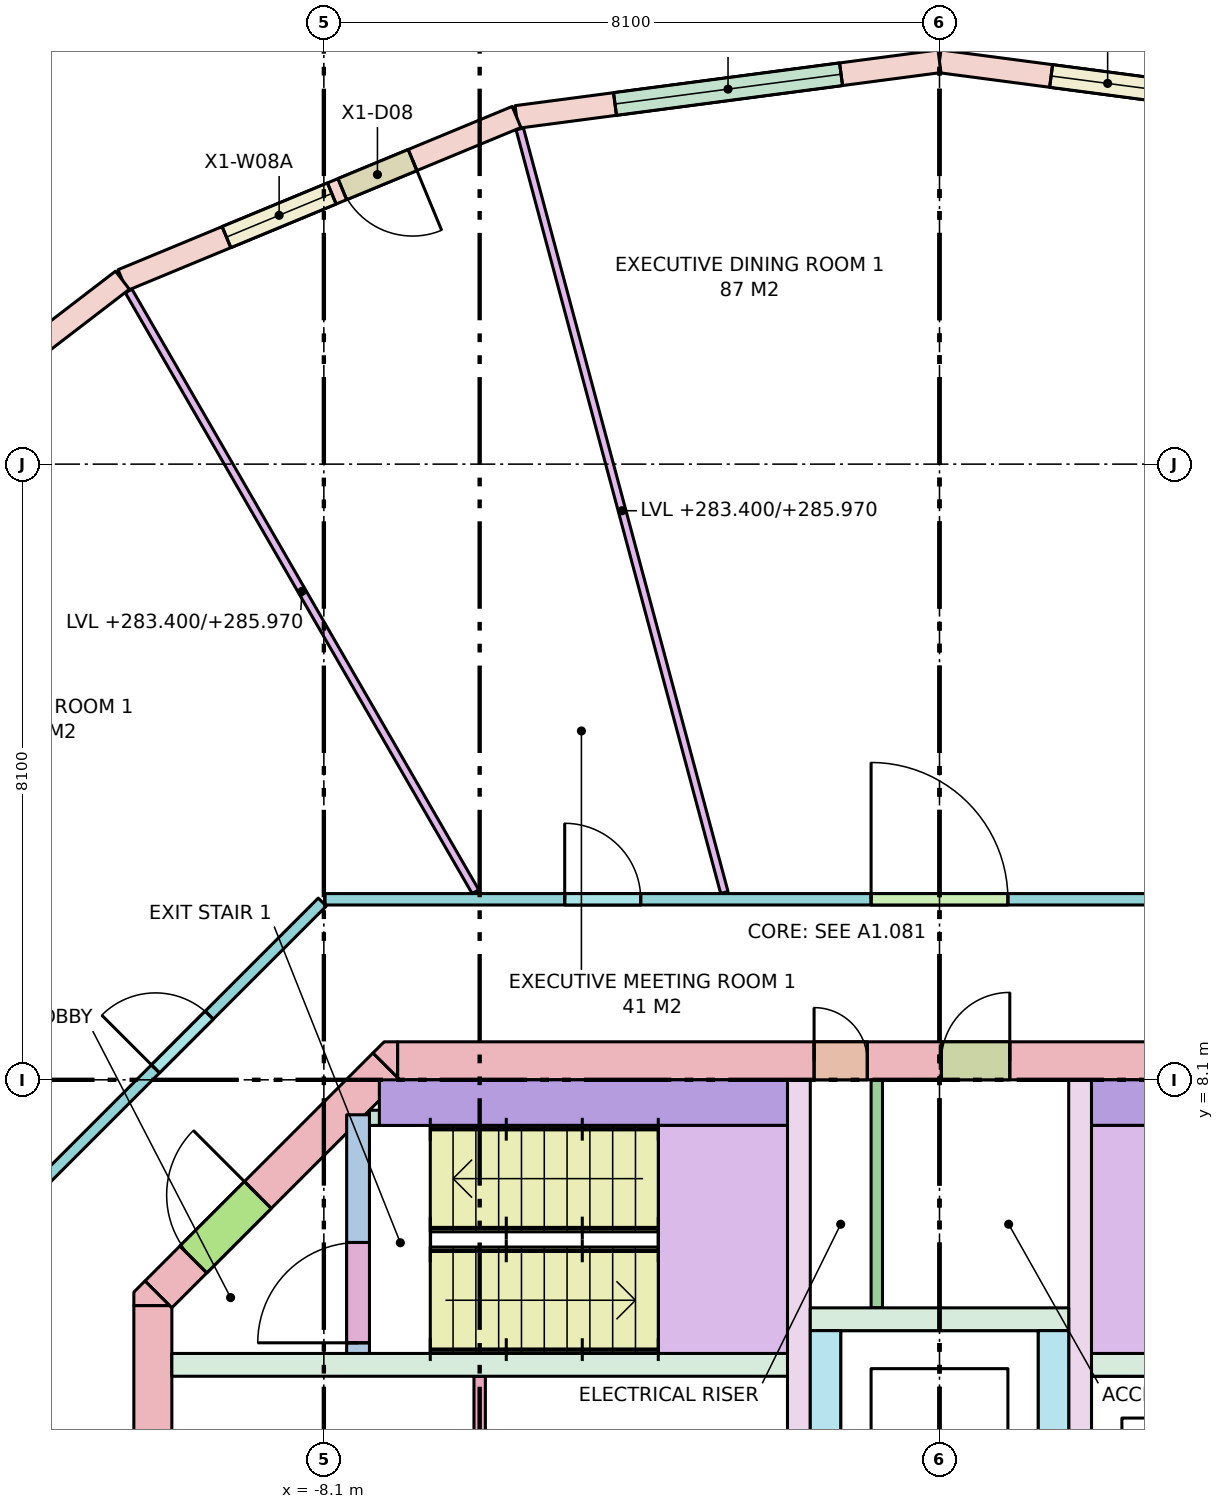
"""IFC4 building model, lengths in metres.
Left out: names, types, materials, properties, quantities, classifications, styles, units other than length and angle.
Written with IfcOpenShell. Run it as: python <this file> out.ifc"""

import sys

from ifc_helpers import new_model, si_unit, direction, frame, frame_2d, origin, place, context, subcontext, project, spatial, polyline, rectangle, outline, extrude, element, fill, save


model = new_model("IFC4")
c1 = context("Model", 3, precision=1e-05, world=origin(), true_north=direction((0.0, 1.0)))
c2 = subcontext(c1, "Body", "Model", "MODEL_VIEW")
j1 = project(units=[si_unit("LENGTHUNIT", "METRE"), si_unit("PLANEANGLEUNIT", "RADIAN")], contexts=[c1])
p1 = place(None, origin())
s1 = spatial("IfcSite", under=j1, at=p1, CompositionType="ELEMENT")
p2 = place(p1, origin())
s2 = spatial("IfcBuilding", under=s1, at=p2, CompositionType="ELEMENT")
p3 = place(p2, frame((0.0, 0.0, 283.4)))
s3 = spatial("IfcBuildingStorey", under=s2, at=p3, CompositionType="ELEMENT", Elevation=283.4)
p4 = place(p3, frame((-7.13, 8.35, -0.28), z_axis=(0.0, 0.0, 1.0), x_axis=(1.0, 0.0, 0.0)))
e1 = element("IfcWall", 1, at=p4, inside=s3, PredefinedType="SHEAR", context=c2, shape_type="SweptSolid", body=[
    extrude(rectangle(XDim=14.26, YDim=0.5, at=frame_2d((7.13, 0.0))), origin(), (0.0, 0.0, 1.0), 3.7),
])
p5 = place(p4, frame((5.48, 0.0, 0.28)))
e2 = element("IfcOpeningElement", 2, at=p5, cuts=e1, PredefinedType="OPENING", context=c2, shape_type="SweptSolid", body=[
    extrude(rectangle(XDim=0.7, YDim=2.1, at=frame_2d((0.35, 1.05))), frame((0.0, 0.26, 0.0), z_axis=(0.0, -1.0, 0.0), x_axis=(1.0, 0.0, 0.0)), (0.0, 0.0, 1.0), 0.52),
])
p6 = place(p4, frame((7.155, 0.0, 0.28)))
e3 = element("IfcOpeningElement", 3, at=p6, cuts=e1, PredefinedType="OPENING", context=c2, shape_type="SweptSolid", body=[
    extrude(rectangle(XDim=0.9, YDim=2.1, at=frame_2d((0.45, 1.05))), frame((0.0, 0.26, 0.0), z_axis=(0.0, -1.0, 0.0), x_axis=(1.0, 0.0, 0.0)), (0.0, 0.0, 1.0), 0.52),
])
p7 = place(p3, frame((-10.35, -5.13, -0.28), z_axis=(0.0, 0.0, 1.0), x_axis=(0.0, 1.0, 0.0)))
e4 = element("IfcWall", 4, at=p7, inside=s3, PredefinedType="SHEAR", context=c2, shape_type="SweptSolid", body=[
    extrude(rectangle(XDim=10.26, YDim=0.5, at=frame_2d((5.13, 0.0))), origin(), (0.0, 0.0, 1.0), 3.7),
])
p8 = place(p7, frame((4.13, 0.0, 0.28)))
e5 = element("IfcOpeningElement", 5, at=p8, cuts=e4, PredefinedType="OPENING", context=c2, shape_type="SweptSolid", body=[
    extrude(rectangle(XDim=2.0, YDim=2.1, at=frame_2d((1.0, 1.05))), frame((0.0, 0.26, 0.0), z_axis=(0.0, -1.0, 0.0), x_axis=(1.0, 0.0, 0.0)), (0.0, 0.0, 1.0), 0.52),
])
p9 = place(p3, frame((-10.277, 5.277, -0.28), z_axis=(0.0, 0.0, 1.0), x_axis=(0.707106781187, 0.707106781187, 0.0)))
e6 = element("IfcWall", 6, at=p9, inside=s3, PredefinedType="SHEAR", context=c2, shape_type="SweptSolid", body=[
    extrude(rectangle(XDim=4.243, YDim=0.5, at=frame_2d((2.121, 0.0))), origin(), (0.0, 0.0, 1.0), 3.7),
])
p10 = place(p9, frame((0.65, 0.0, 0.28)))
e7 = element("IfcOpeningElement", 7, at=p10, cuts=e6, PredefinedType="OPENING", context=c2, shape_type="SweptSolid", body=[
    extrude(rectangle(XDim=1.2, YDim=2.1, at=frame_2d((0.6, 1.05))), frame((0.0, 0.26, 0.0), z_axis=(0.0, -1.0, 0.0), x_axis=(1.0, 0.0, 0.0)), (0.0, 0.0, 1.0), 0.52),
])
p11 = place(p3, frame((0.0, 0.0, -0.28)))
e8 = element("IfcWall", 8, at=p11, inside=s3, PredefinedType="SHEAR", context=c2, shape_type="SweptSolid", body=[
    extrude(outline(polyline([(-10.454, 5.454), (-10.13, 5.13), (-10.6, 5.13), (-10.6, 5.307), (-10.454, 5.454)])), origin(), (0.0, 0.0, 1.0), 3.7),
])
p12 = place(p3, frame((0.0, 0.0, -0.28)))
e9 = element("IfcWall", 9, at=p12, inside=s3, PredefinedType="SHEAR", context=c2, shape_type="SweptSolid", body=[
    extrude(outline(polyline([(-7.307, 8.6), (-7.13, 8.6), (-7.13, 8.13), (-7.454, 8.454), (-7.307, 8.6)])), origin(), (0.0, 0.0, 1.0), 3.7),
])
for number, where, z_axis, x_axis in (
    (10, (-10.1, 4.35, 0.0), (0.0, 0.0, 1.0), (1.0, 0.0, 0.0)),
    (11, (2.0, 4.35, 0.0), (0.0, 0.0, 1.0), (1.0, 0.0, 0.0)),
):
    element("IfcWall", number, at=place(p3, frame(where, z_axis=z_axis, x_axis=x_axis)), inside=s3, PredefinedType="SOLIDWALL", context=c2, shape_type="SweptSolid", body=[
        extrude(rectangle(XDim=8.1, YDim=0.3, at=frame_2d((4.05, 0.0))), origin(), (0.0, 0.0, 1.0), 3.42),
    ])
for number, where, z_axis, x_axis in (
    (12, (-1.85, 1.5, 0.0), (0.0, 0.0, 1.0), (0.0, 1.0, 0.0)),
    (13, (1.85, 1.5, 0.0), (0.0, 0.0, 1.0), (0.0, 1.0, 0.0)),
):
    element("IfcWall", number, at=place(p3, frame(where, z_axis=z_axis, x_axis=x_axis)), inside=s3, PredefinedType="SHEAR", context=c2, shape_type="SweptSolid", body=[
        extrude(rectangle(XDim=6.6, YDim=0.3, at=frame_2d((3.3, 0.0))), origin(), (0.0, 0.0, 1.0), 3.42),
    ])
for number, where, z_axis, x_axis in (
    (14, (-1.5, 1.8, 0.0), (0.0, 0.0, 1.0), (0.0, 1.0, 0.0)),
    (15, (1.5, 1.8, 0.0), (0.0, 0.0, 1.0), (0.0, 1.0, 0.0)),
):
    element("IfcWall", number, at=place(p3, frame(where, z_axis=z_axis, x_axis=x_axis)), inside=s3, PredefinedType="SOLIDWALL", context=c2, shape_type="SweptSolid", body=[
        extrude(rectangle(XDim=3.0, YDim=0.4, at=frame_2d((1.5, 0.0))), origin(), (0.0, 0.0, 1.0), 3.42),
    ])
p13 = place(p3, frame((-1.7, 4.95, 0.0), z_axis=(0.0, 0.0, 1.0), x_axis=(1.0, 0.0, 0.0)))
e16 = element("IfcWall", 16, at=p13, inside=s3, PredefinedType="SOLIDWALL", context=c2, shape_type="SweptSolid", body=[
    extrude(rectangle(XDim=3.4, YDim=0.3, at=frame_2d((1.7, 0.0))), origin(), (0.0, 0.0, 1.0), 3.42),
])
p14 = place(p3, frame((-7.65, 4.5, 0.0), z_axis=(0.0, 0.0, 1.0), x_axis=(0.0, 1.0, 0.0)))
e17 = element("IfcWall", 17, at=p14, inside=s3, PredefinedType="SHEAR", context=c2, shape_type="SweptSolid", body=[
    extrude(rectangle(XDim=3.14, YDim=0.3, at=frame_2d((1.57, 0.0))), origin(), (0.0, 0.0, 1.0), 3.42),
])
p15 = place(p14, frame((0.14, 0.0, 0.0)))
e18 = element("IfcOpeningElement", 18, at=p15, cuts=e17, PredefinedType="OPENING", context=c2, shape_type="SweptSolid", body=[
    extrude(rectangle(XDim=1.32, YDim=2.1, at=frame_2d((0.66, 1.05))), frame((0.0, 0.16, 0.0), z_axis=(0.0, -1.0, 0.0), x_axis=(1.0, 0.0, 0.0)), (0.0, 0.0, 1.0), 0.32),
])
for number, where, z_axis, x_axis in (
    (19, (-7.37, 7.8, 0.0), (0.0, 0.0, 1.0), (1.0, 0.0, 0.0)),
    (20, (2.0, 7.8, 0.0), (0.0, 0.0, 1.0), (1.0, 0.0, 0.0)),
):
    element("IfcWall", number, at=place(p3, frame(where, z_axis=z_axis, x_axis=x_axis)), inside=s3, PredefinedType="SHEAR", context=c2, shape_type="SweptSolid", body=[
        extrude(rectangle(XDim=5.37, YDim=0.6, at=frame_2d((2.685, 0.0))), origin(), (0.0, 0.0, 1.0), 3.42),
    ])
p16 = place(p3, frame((-7.5, 7.6, 0.0), z_axis=(0.0, 0.0, 1.0), x_axis=(1.0, 0.0, 0.0)))
e21 = element("IfcWall", 21, at=p16, inside=s3, PredefinedType="SHEAR", context=c2, shape_type="SweptSolid", body=[
    extrude(rectangle(XDim=0.6, YDim=0.2, at=frame_2d((0.3, 0.0))), origin(), (0.0, 0.0, 1.0), 3.42),
])
p17 = place(p3, frame((5.565, 20.767, 0.0), z_axis=(0.0, 0.0, 1.0), x_axis=(-0.991443484334, 0.130536651449, 0.0)))
e22 = element("IfcWall", 22, at=p17, inside=s3, PredefinedType="STANDARD", context=c2, shape_type="SweptSolid", body=[
    extrude(rectangle(XDim=5.613, YDim=0.3, at=frame_2d((2.806, 0.0))), origin(), (0.0, 0.0, 1.0), 3.42),
])
p18 = place(p17, frame((1.481, 0.0, 0.0)))
e23 = element("IfcOpeningElement", 23, at=p18, cuts=e22, PredefinedType="OPENING", context=c2, shape_type="SweptSolid", body=[
    extrude(rectangle(XDim=1.0, YDim=2.4, at=frame_2d((0.5, 1.2))), frame((0.0, 0.16, 0.0), z_axis=(0.0, -1.0, 0.0), x_axis=(1.0, 0.0, 0.0)), (0.0, 0.0, 1.0), 0.32),
])
p19 = place(p17, frame((2.631, 0.0, 0.8)))
e24 = element("IfcOpeningElement", 24, at=p19, cuts=e22, PredefinedType="OPENING", context=c2, shape_type="SweptSolid", body=[
    extrude(rectangle(XDim=1.5, YDim=2.4, at=frame_2d((0.75, 1.2))), frame((0.0, 0.16, 0.0), z_axis=(0.0, -1.0, 0.0), x_axis=(1.0, 0.0, 0.0)), (0.0, 0.0, 1.0), 0.32),
])
p20 = place(p3, frame((0.0, 21.5, 0.0), z_axis=(0.0, 0.0, 1.0), x_axis=(-0.991443484334, -0.130536651449, 0.0)))
e25 = element("IfcWall", 25, at=p20, inside=s3, PredefinedType="STANDARD", context=c2, shape_type="SweptSolid", body=[
    extrude(rectangle(XDim=5.613, YDim=0.3, at=frame_2d((2.806, 0.0))), origin(), (0.0, 0.0, 1.0), 3.42),
])
p21 = place(p20, frame((1.306, 0.0, 0.8)))
e26 = element("IfcOpeningElement", 26, at=p21, cuts=e25, PredefinedType="OPENING", context=c2, shape_type="SweptSolid", body=[
    extrude(rectangle(XDim=3.0, YDim=2.4, at=frame_2d((1.5, 1.2))), frame((0.0, 0.16, 0.0), z_axis=(0.0, -1.0, 0.0), x_axis=(1.0, 0.0, 0.0)), (0.0, 0.0, 1.0), 0.32),
])
p22 = place(p3, frame((-5.565, 20.767, 0.0), z_axis=(0.0, 0.0, 1.0), x_axis=(-0.92387156362, -0.382702670405, 0.0)))
e27 = element("IfcWall", 27, at=p22, inside=s3, PredefinedType="STANDARD", context=c2, shape_type="SweptSolid", body=[
    extrude(rectangle(XDim=5.613, YDim=0.3, at=frame_2d((2.806, 0.0))), origin(), (0.0, 0.0, 1.0), 3.42),
])
p23 = place(p22, frame((1.481, 0.0, 0.0)))
e28 = element("IfcOpeningElement", 28, at=p23, cuts=e27, PredefinedType="OPENING", context=c2, shape_type="SweptSolid", body=[
    extrude(rectangle(XDim=1.0, YDim=2.4, at=frame_2d((0.5, 1.2))), frame((0.0, 0.16, 0.0), z_axis=(0.0, -1.0, 0.0), x_axis=(1.0, 0.0, 0.0)), (0.0, 0.0, 1.0), 0.32),
])
p24 = place(p22, frame((2.631, 0.0, 0.8)))
e29 = element("IfcOpeningElement", 29, at=p24, cuts=e27, PredefinedType="OPENING", context=c2, shape_type="SweptSolid", body=[
    extrude(rectangle(XDim=1.5, YDim=2.4, at=frame_2d((0.75, 1.2))), frame((0.0, 0.16, 0.0), z_axis=(0.0, -1.0, 0.0), x_axis=(1.0, 0.0, 0.0)), (0.0, 0.0, 1.0), 0.32),
])
p25 = place(p3, frame((-10.75, 18.619, 0.0), z_axis=(0.0, 0.0, 1.0), x_axis=(-0.793380165925, -0.608726467567, 0.0)))
e30 = element("IfcWall", 30, at=p25, inside=s3, PredefinedType="STANDARD", context=c2, shape_type="SweptSolid", body=[
    extrude(rectangle(XDim=5.613, YDim=0.3, at=frame_2d((2.806, 0.0))), origin(), (0.0, 0.0, 1.0), 3.42),
])
p26 = place(p25, frame((1.306, 0.0, 0.8)))
e31 = element("IfcOpeningElement", 31, at=p26, cuts=e30, PredefinedType="OPENING", context=c2, shape_type="SweptSolid", body=[
    extrude(rectangle(XDim=3.0, YDim=2.4, at=frame_2d((1.5, 1.2))), frame((0.0, 0.16, 0.0), z_axis=(0.0, -1.0, 0.0), x_axis=(1.0, 0.0, 0.0)), (0.0, 0.0, 1.0), 0.32),
])
p27 = place(p3, frame((-0.825, 5.1, 0.0), z_axis=(0.0, 0.0, 1.0), x_axis=(0.0, 1.0, 0.0)))
e32 = element("IfcWall", 32, at=p27, inside=s3, PredefinedType="PARTITIONING", context=c2, shape_type="SweptSolid", body=[
    extrude(rectangle(XDim=3.0, YDim=0.15, at=frame_2d((1.5, 0.0))), origin(), (0.0, 0.0, 1.0), 3.42),
])
p28 = place(p3, frame((-6.05, 1.65, 0.0), z_axis=(0.0, 0.0, 1.0), x_axis=(0.0, 1.0, 0.0)))
e33 = element("IfcWall", 33, at=p28, inside=s3, PredefinedType="PARTITIONING", context=c2, shape_type="SweptSolid", body=[
    extrude(rectangle(XDim=2.55, YDim=0.15, at=frame_2d((1.275, 0.0))), origin(), (0.0, 0.0, 1.0), 3.42),
])
p29 = place(p3, frame((-12.438, 6.121, 0.0), z_axis=(0.0, 0.0, 1.0), x_axis=(0.707106781187, 0.707106781187, 0.0)))
e34 = element("IfcWall", 34, at=p29, inside=s3, PredefinedType="PARTITIONING", context=c2, shape_type="SweptSolid", body=[
    extrude(rectangle(XDim=6.105, YDim=0.15, at=frame_2d((3.053, 0.0))), origin(), (0.0, 0.0, 1.0), 2.57),
])
p30 = place(p29, frame((3.002, 0.0, 0.0)))
e35 = element("IfcOpeningElement", 35, at=p30, cuts=e34, PredefinedType="OPENING", context=c2, shape_type="SweptSolid", body=[
    extrude(rectangle(XDim=1.0, YDim=2.1, at=frame_2d((0.5, 1.05))), frame((0.0, 0.085, 0.0), z_axis=(0.0, -1.0, 0.0), x_axis=(1.0, 0.0, 0.0)), (0.0, 0.0, 1.0), 0.17),
])
p31 = place(p3, frame((-8.084, 10.475, 0.0), z_axis=(0.0, 0.0, 1.0), x_axis=(1.0, 0.0, 0.0)))
e36 = element("IfcWall", 36, at=p31, inside=s3, PredefinedType="PARTITIONING", context=c2, shape_type="SweptSolid", body=[
    extrude(rectangle(XDim=16.167, YDim=0.15, at=frame_2d((8.084, 0.0))), origin(), (0.0, 0.0, 1.0), 2.57),
])
p32 = place(p31, frame((13.004, 0.0, 0.0)))
e37 = element("IfcOpeningElement", 37, at=p32, cuts=e36, PredefinedType="OPENING", context=c2, shape_type="SweptSolid", body=[
    extrude(rectangle(XDim=1.0, YDim=2.1, at=frame_2d((0.5, 1.05))), frame((0.0, 0.085, 0.0), z_axis=(0.0, -1.0, 0.0), x_axis=(1.0, 0.0, 0.0)), (0.0, 0.0, 1.0), 0.17),
])
p33 = place(p31, frame((7.184, 0.0, 0.0)))
e38 = element("IfcOpeningElement", 38, at=p33, cuts=e36, PredefinedType="OPENING", context=c2, shape_type="SweptSolid", body=[
    extrude(rectangle(XDim=1.8, YDim=2.1, at=frame_2d((0.9, 1.05))), frame((0.0, 0.085, 0.0), z_axis=(0.0, -1.0, 0.0), x_axis=(1.0, 0.0, 0.0)), (0.0, 0.0, 1.0), 0.17),
])
p34 = place(p31, frame((3.153, 0.0, 0.0)))
e39 = element("IfcOpeningElement", 39, at=p34, cuts=e36, PredefinedType="OPENING", context=c2, shape_type="SweptSolid", body=[
    extrude(rectangle(XDim=1.0, YDim=2.1, at=frame_2d((0.5, 1.05))), frame((0.0, 0.085, 0.0), z_axis=(0.0, -1.0, 0.0), x_axis=(1.0, 0.0, 0.0)), (0.0, 0.0, 1.0), 0.17),
])
p35 = place(p3, frame((-2.831, 10.564, 0.0), z_axis=(0.0, 0.0, 1.0), x_axis=(-0.258796321138, 0.965931914871, 0.0)))
e40 = element("IfcWall", 40, at=p35, inside=s3, PredefinedType="PARTITIONING", context=c2, shape_type="SweptSolid", body=[
    extrude(rectangle(XDim=10.4, YDim=0.1, at=frame_2d((5.2, 0.0))), origin(), (0.0, 0.0, 1.0), 2.57),
])
p36 = place(p3, frame((-6.105, 10.575, 0.0), z_axis=(0.0, 0.0, 1.0), x_axis=(-0.500020406621, 0.866013621696, 0.0)))
e41 = element("IfcWall", 41, at=p36, inside=s3, PredefinedType="PARTITIONING", context=c2, shape_type="SweptSolid", body=[
    extrude(rectangle(XDim=9.126, YDim=0.1, at=frame_2d((4.563, 0.0))), origin(), (0.0, 0.0, 1.0), 2.57),
])
p37 = place(p19, origin())
e42 = element("IfcWindow", 42, at=p37, inside=s3, PartitioningType="SINGLE_PANEL", PredefinedType="WINDOW", context=c2, shape_type="SweptSolid", body=[
    extrude(rectangle(XDim=1.5, YDim=2.4, at=frame_2d((0.75, 1.2))), frame((0.0, 0.03, 0.0), z_axis=(0.0, -1.0, 0.0), x_axis=(1.0, 0.0, 0.0)), (0.0, 0.0, 1.0), 0.06),
])
fill(e24, e42)
p38 = place(p21, origin())
e43 = element("IfcWindow", 43, at=p38, inside=s3, PartitioningType="SINGLE_PANEL", PredefinedType="WINDOW", context=c2, shape_type="SweptSolid", body=[
    extrude(rectangle(XDim=3.0, YDim=2.4, at=frame_2d((1.5, 1.2))), frame((0.0, 0.03, 0.0), z_axis=(0.0, -1.0, 0.0), x_axis=(1.0, 0.0, 0.0)), (0.0, 0.0, 1.0), 0.06),
])
fill(e26, e43)
p39 = place(p23, origin())
e44 = element("IfcDoor", 44, at=p39, inside=s3, OperationType="SINGLE_SWING_LEFT", PredefinedType="DOOR", context=c2, shape_type="SweptSolid", body=[
    extrude(rectangle(XDim=1.0, YDim=2.4, at=frame_2d((0.5, 1.2))), frame((0.0, 0.025, 0.0), z_axis=(0.0, -1.0, 0.0), x_axis=(1.0, 0.0, 0.0)), (0.0, 0.0, 1.0), 0.05),
])
fill(e28, e44)
p40 = place(p24, origin())
e45 = element("IfcWindow", 45, at=p40, inside=s3, PartitioningType="SINGLE_PANEL", PredefinedType="WINDOW", context=c2, shape_type="SweptSolid", body=[
    extrude(rectangle(XDim=1.5, YDim=2.4, at=frame_2d((0.75, 1.2))), frame((0.0, 0.03, 0.0), z_axis=(0.0, -1.0, 0.0), x_axis=(1.0, 0.0, 0.0)), (0.0, 0.0, 1.0), 0.06),
])
fill(e29, e45)
p41 = place(p15, origin())
e46 = element("IfcDoor", 46, at=p41, inside=s3, OperationType="DOUBLE_DOOR_SINGLE_SWING", PredefinedType="DOOR", context=c2, shape_type="SweptSolid", body=[
    extrude(rectangle(XDim=1.32, YDim=2.1, at=frame_2d((0.66, 1.05))), frame((0.0, 0.025, 0.0), z_axis=(0.0, -1.0, 0.0), x_axis=(1.0, 0.0, 0.0)), (0.0, 0.0, 1.0), 0.05),
])
fill(e18, e46)
p42 = place(p10, origin())
e47 = element("IfcDoor", 47, at=p42, inside=s3, OperationType="SINGLE_SWING_RIGHT", PredefinedType="DOOR", context=c2, shape_type="SweptSolid", body=[
    extrude(rectangle(XDim=1.2, YDim=2.1, at=frame_2d((0.6, 1.05))), frame((0.0, 0.025, 0.0), z_axis=(0.0, -1.0, 0.0), x_axis=(1.0, 0.0, 0.0)), (0.0, 0.0, 1.0), 0.05),
])
fill(e7, e47)
p43 = place(p5, origin())
e48 = element("IfcDoor", 48, at=p43, inside=s3, OperationType="SINGLE_SWING_LEFT", PredefinedType="DOOR", context=c2, shape_type="SweptSolid", body=[
    extrude(rectangle(XDim=0.7, YDim=2.1, at=frame_2d((0.35, 1.05))), frame((0.0, 0.025, 0.0), z_axis=(0.0, -1.0, 0.0), x_axis=(1.0, 0.0, 0.0)), (0.0, 0.0, 1.0), 0.05),
])
fill(e2, e48)
p44 = place(p6, origin())
e49 = element("IfcDoor", 49, at=p44, inside=s3, OperationType="SINGLE_SWING_RIGHT", PredefinedType="DOOR", context=c2, shape_type="SweptSolid", body=[
    extrude(rectangle(XDim=0.9, YDim=2.1, at=frame_2d((0.45, 1.05))), frame((0.0, 0.025, 0.0), z_axis=(0.0, -1.0, 0.0), x_axis=(1.0, 0.0, 0.0)), (0.0, 0.0, 1.0), 0.05),
])
fill(e3, e49)
p45 = place(p33, origin())
e50 = element("IfcDoor", 50, at=p45, inside=s3, OperationType="DOUBLE_DOOR_SINGLE_SWING", PredefinedType="DOOR", context=c2, shape_type="SweptSolid", body=[
    extrude(rectangle(XDim=1.8, YDim=2.1, at=frame_2d((0.9, 1.05))), frame((0.0, 0.025, 0.0), z_axis=(0.0, -1.0, 0.0), x_axis=(1.0, 0.0, 0.0)), (0.0, 0.0, 1.0), 0.05),
])
fill(e38, e50)
p46 = place(p34, origin())
e51 = element("IfcDoor", 51, at=p46, inside=s3, OperationType="SINGLE_SWING_LEFT", PredefinedType="DOOR", context=c2, shape_type="SweptSolid", body=[
    extrude(rectangle(XDim=1.0, YDim=2.1, at=frame_2d((0.5, 1.05))), frame((0.0, 0.025, 0.0), z_axis=(0.0, -1.0, 0.0), x_axis=(1.0, 0.0, 0.0)), (0.0, 0.0, 1.0), 0.05),
])
fill(e39, e51)
p47 = place(p30, origin())
e52 = element("IfcDoor", 52, at=p47, inside=s3, OperationType="SINGLE_SWING_LEFT", PredefinedType="DOOR", context=c2, shape_type="SweptSolid", body=[
    extrude(rectangle(XDim=1.0, YDim=2.1, at=frame_2d((0.5, 1.05))), frame((0.0, 0.025, 0.0), z_axis=(0.0, -1.0, 0.0), x_axis=(1.0, 0.0, 0.0)), (0.0, 0.0, 1.0), 0.05),
])
fill(e35, e52)
save(model, sys.argv[1])
